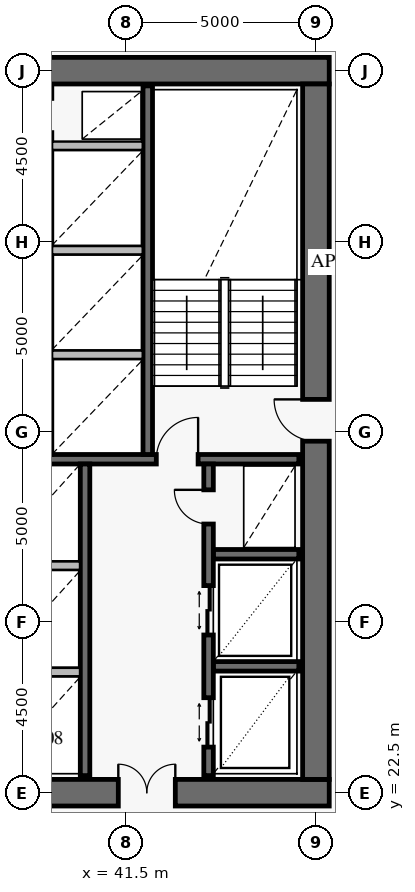
"""IFC4 building model, lengths in metres.
Left out: names, types, materials, properties, quantities, classifications, styles, units other than length and angle.
Written with IfcOpenShell. Run it as: python <this file> out.ifc"""

import sys

from ifc_helpers import new_model, si_unit, direction, frame, frame_2d, origin, place, context, subcontext, project, spatial, rectangle, extrude, element, fill, save


model = new_model("IFC4")
c1 = context("Model", 3, precision=1e-05, world=origin(), true_north=direction((0.0, 1.0)))
c2 = subcontext(c1, "Body", "Model", "MODEL_VIEW")
j1 = project(units=[si_unit("LENGTHUNIT", "METRE"), si_unit("PLANEANGLEUNIT", "RADIAN")], contexts=[c1])
p1 = place(None, origin())
s1 = spatial("IfcSite", under=j1, at=p1, CompositionType="ELEMENT")
p2 = place(p1, origin())
s2 = spatial("IfcBuilding", under=s1, at=p2, CompositionType="ELEMENT")
p3 = place(p2, frame((0.0, 0.0, 126.6)))
s3 = spatial("IfcBuildingStorey", under=s2, at=p3, CompositionType="ELEMENT", Elevation=126.6)
p4 = place(p3, frame((37.35, 22.5, 0.0), z_axis=(0.0, 0.0, 1.0), x_axis=(1.0, 0.0, 0.0)))
e1 = element("IfcWall", 1, at=p4, inside=s3, PredefinedType="SHEAR", context=c2, shape_type="SweptSolid", body=[
    extrude(rectangle(XDim=9.5, YDim=0.7, at=frame_2d((4.75, 0.0))), origin(), (0.0, 0.0, 1.0), 3.8),
])
p5 = place(p4, frame((3.95, 0.0, 0.0)))
e2 = element("IfcOpeningElement", 2, at=p5, cuts=e1, PredefinedType="OPENING", context=c2, shape_type="SweptSolid", body=[
    extrude(rectangle(XDim=1.5, YDim=2.15, at=frame_2d((0.75, 1.075))), frame((0.0, 0.362, 0.0), z_axis=(0.0, -1.0, 0.0), x_axis=(1.0, 0.0, 0.0)), (0.0, 0.0, 1.0), 0.724),
])
p6 = place(p3, frame((46.85, 41.5, 0.0), z_axis=(0.0, 0.0, 1.0), x_axis=(-1.0, 0.0, 0.0)))
e3 = element("IfcWall", 3, at=p6, inside=s3, PredefinedType="SHEAR", context=c2, shape_type="SweptSolid", body=[
    extrude(rectangle(XDim=7.9, YDim=0.7, at=frame_2d((3.95, 0.0))), origin(), (0.0, 0.0, 1.0), 3.8),
])
p7 = place(p3, frame((46.5, 22.85, 0.0), z_axis=(0.0, 0.0, 1.0), x_axis=(0.0, 1.0, 0.0)))
e4 = element("IfcWall", 4, at=p7, inside=s3, PredefinedType="SHEAR", context=c2, shape_type="SweptSolid", body=[
    extrude(rectangle(XDim=18.3, YDim=0.7, at=frame_2d((9.15, 0.0))), origin(), (0.0, 0.0, 1.0), 3.8),
])
p8 = place(p7, frame((8.9, 0.0, 0.0)))
e5 = element("IfcOpeningElement", 5, at=p8, cuts=e4, PredefinedType="OPENING", context=c2, shape_type="SweptSolid", body=[
    extrude(rectangle(XDim=1.1, YDim=2.15, at=frame_2d((0.55, 1.075))), frame((0.0, 0.362, 0.0), z_axis=(0.0, -1.0, 0.0), x_axis=(1.0, 0.0, 0.0)), (0.0, 0.0, 1.0), 0.724),
])
p9 = place(p3, frame((25.95, 31.275, 0.0), z_axis=(0.0, 0.0, 1.0), x_axis=(1.0, 0.0, 0.0)))
e6 = element("IfcWall", 6, at=p9, inside=s3, PredefinedType="SOLIDWALL", context=c2, shape_type="SweptSolid", body=[
    extrude(rectangle(XDim=20.1, YDim=0.25, at=frame_2d((10.05, 0.0))), origin(), (0.0, 0.0, 1.0), 3.8),
])
p10 = place(p9, frame((2.6, 0.0, 0.0)))
e7 = element("IfcOpeningElement", 7, at=p10, cuts=e6, PredefinedType="OPENING", context=c2, shape_type="SweptSolid", body=[
    extrude(rectangle(XDim=1.1, YDim=2.15, at=frame_2d((0.55, 1.075))), frame((0.0, 0.137, 0.0), z_axis=(0.0, -1.0, 0.0), x_axis=(1.0, 0.0, 0.0)), (0.0, 0.0, 1.0), 0.274),
])
p11 = place(p9, frame((10.6, 0.0, 0.0)))
e8 = element("IfcOpeningElement", 8, at=p11, cuts=e6, PredefinedType="OPENING", context=c2, shape_type="SweptSolid", body=[
    extrude(rectangle(XDim=1.1, YDim=2.15, at=frame_2d((0.55, 1.075))), frame((0.0, 0.137, 0.0), z_axis=(0.0, -1.0, 0.0), x_axis=(1.0, 0.0, 0.0)), (0.0, 0.0, 1.0), 0.274),
])
p12 = place(p9, frame((16.35, 0.0, 0.0)))
e9 = element("IfcOpeningElement", 9, at=p12, cuts=e6, PredefinedType="OPENING", context=c2, shape_type="SweptSolid", body=[
    extrude(rectangle(XDim=1.1, YDim=2.15, at=frame_2d((0.55, 1.075))), frame((0.0, 0.137, 0.0), z_axis=(0.0, -1.0, 0.0), x_axis=(1.0, 0.0, 0.0)), (0.0, 0.0, 1.0), 0.274),
])
p13 = place(p3, frame((42.075, 31.4, 0.0), z_axis=(0.0, 0.0, 1.0), x_axis=(0.0, 1.0, 0.0)))
e10 = element("IfcWall", 10, at=p13, inside=s3, PredefinedType="SOLIDWALL", context=c2, shape_type="SweptSolid", body=[
    extrude(rectangle(XDim=9.7, YDim=0.25, at=frame_2d((4.85, 0.0))), origin(), (0.0, 0.0, 1.0), 3.8),
])
p14 = place(p3, frame((40.425, 22.95, 0.0), z_axis=(0.0, 0.0, 1.0), x_axis=(0.0, 1.0, 0.0)))
e11 = element("IfcWall", 11, at=p14, inside=s3, PredefinedType="SOLIDWALL", context=c2, shape_type="SweptSolid", body=[
    extrude(rectangle(XDim=8.2, YDim=0.25, at=frame_2d((4.1, 0.0))), origin(), (0.0, 0.0, 1.0), 3.8),
])
for number, where, z_axis, x_axis in (
    (12, (43.8, 25.825, 0.0), (0.0, 0.0, 1.0), (1.0, 0.0, 0.0)),
    (13, (43.8, 28.775, 0.0), (0.0, 0.0, 1.0), (1.0, 0.0, 0.0)),
):
    element("IfcWall", number, at=place(p3, frame(where, z_axis=z_axis, x_axis=x_axis)), inside=s3, PredefinedType="SOLIDWALL", context=c2, shape_type="SweptSolid", body=[
        extrude(rectangle(XDim=2.25, YDim=0.25, at=frame_2d((1.125, 0.0))), origin(), (0.0, 0.0, 1.0), 3.8),
    ])
p15 = place(p3, frame((43.675, 22.95, 0.0), z_axis=(0.0, 0.0, 1.0), x_axis=(0.0, 1.0, 0.0)))
e14 = element("IfcWall", 14, at=p15, inside=s3, PredefinedType="SOLIDWALL", context=c2, shape_type="SweptSolid", body=[
    extrude(rectangle(XDim=8.2, YDim=0.25, at=frame_2d((4.1, 0.0))), origin(), (0.0, 0.0, 1.0), 3.8),
])
p16 = place(p15, frame((0.75, 0.0, 0.0)))
e15 = element("IfcOpeningElement", 15, at=p16, cuts=e14, PredefinedType="OPENING", context=c2, shape_type="SweptSolid", body=[
    extrude(rectangle(XDim=1.3, YDim=2.3, at=frame_2d((0.65, 1.15))), frame((0.0, 0.137, 0.0), z_axis=(0.0, -1.0, 0.0), x_axis=(1.0, 0.0, 0.0)), (0.0, 0.0, 1.0), 0.274),
])
p17 = place(p15, frame((3.7, 0.0, 0.0)))
e16 = element("IfcOpeningElement", 16, at=p17, cuts=e14, PredefinedType="OPENING", context=c2, shape_type="SweptSolid", body=[
    extrude(rectangle(XDim=1.3, YDim=2.3, at=frame_2d((0.65, 1.15))), frame((0.0, 0.137, 0.0), z_axis=(0.0, -1.0, 0.0), x_axis=(1.0, 0.0, 0.0)), (0.0, 0.0, 1.0), 0.274),
])
p18 = place(p15, frame((6.62, 0.0, 0.0)))
e17 = element("IfcOpeningElement", 17, at=p18, cuts=e14, PredefinedType="OPENING", context=c2, shape_type="SweptSolid", body=[
    extrude(rectangle(XDim=0.9, YDim=2.1, at=frame_2d((0.45, 1.05))), frame((0.0, 0.137, 0.0), z_axis=(0.0, -1.0, 0.0), x_axis=(1.0, 0.0, 0.0)), (0.0, 0.0, 1.0), 0.274),
])
for number, where, z_axis, x_axis in (
    (18, (39.558, 34.025, 0.0), (0.0, 0.0, 1.0), (1.0, 0.0, 0.0)),
    (19, (39.558, 36.775, 0.0), (0.0, 0.0, 1.0), (1.0, 0.0, 0.0)),
    (20, (39.558, 39.525, 0.0), (0.0, 0.0, 1.0), (1.0, 0.0, 0.0)),
):
    element("IfcWall", number, at=place(p3, frame(where, z_axis=z_axis, x_axis=x_axis)), inside=s3, PredefinedType="PARTITIONING", context=c2, shape_type="SweptSolid", body=[
        extrude(rectangle(XDim=2.384, YDim=0.22, at=frame_2d((1.192, 0.0))), origin(), (0.0, 0.0, 1.0), 3.55),
    ])
for number, where, z_axis, x_axis in (
    (21, (38.008, 25.675, 0.0), (0.0, 0.0, 1.0), (1.0, 0.0, 0.0)),
    (22, (38.008, 28.475, 0.0), (0.0, 0.0, 1.0), (1.0, 0.0, 0.0)),
):
    element("IfcWall", number, at=place(p3, frame(where, z_axis=z_axis, x_axis=x_axis)), inside=s3, PredefinedType="PARTITIONING", context=c2, shape_type="SweptSolid", body=[
        extrude(rectangle(XDim=2.284, YDim=0.22, at=frame_2d((1.142, 0.0))), origin(), (0.0, 0.0, 1.0), 3.55),
    ])
p19 = place(p8, origin())
e23 = element("IfcDoor", 23, at=p19, inside=s3, OperationType="SINGLE_SWING_RIGHT", PredefinedType="USERDEFINED", context=c2, shape_type="SweptSolid", body=[
    extrude(rectangle(XDim=1.1, YDim=2.15, at=frame_2d((0.55, 1.075))), frame((0.0, 0.025, 0.0), z_axis=(0.0, -1.0, 0.0), x_axis=(1.0, 0.0, 0.0)), (0.0, 0.0, 1.0), 0.05),
])
fill(e5, e23)
p20 = place(p5, origin())
e24 = element("IfcDoor", 24, at=p20, inside=s3, OperationType="DOUBLE_DOOR_SINGLE_SWING", PredefinedType="DOOR", context=c2, shape_type="SweptSolid", body=[
    extrude(rectangle(XDim=1.5, YDim=2.15, at=frame_2d((0.75, 1.075))), frame((0.0, 0.025, 0.0), z_axis=(0.0, -1.0, 0.0), x_axis=(1.0, 0.0, 0.0)), (0.0, 0.0, 1.0), 0.05),
])
fill(e2, e24)
p21 = place(p12, origin())
e25 = element("IfcDoor", 25, at=p21, inside=s3, OperationType="SINGLE_SWING_RIGHT", PredefinedType="USERDEFINED", context=c2, shape_type="SweptSolid", body=[
    extrude(rectangle(XDim=1.1, YDim=2.15, at=frame_2d((0.55, 1.075))), frame((0.0, 0.025, 0.0), z_axis=(0.0, -1.0, 0.0), x_axis=(1.0, 0.0, 0.0)), (0.0, 0.0, 1.0), 0.05),
])
fill(e9, e25)
p22 = place(p16, origin())
e26 = element("IfcDoor", 26, at=p22, inside=s3, OperationType="DOUBLE_DOOR_SLIDING", PredefinedType="DOOR", context=c2, shape_type="SweptSolid", body=[
    extrude(rectangle(XDim=1.3, YDim=2.3, at=frame_2d((0.65, 1.15))), frame((0.0, 0.025, 0.0), z_axis=(0.0, -1.0, 0.0), x_axis=(1.0, 0.0, 0.0)), (0.0, 0.0, 1.0), 0.05),
])
fill(e15, e26)
p23 = place(p17, origin())
e27 = element("IfcDoor", 27, at=p23, inside=s3, OperationType="DOUBLE_DOOR_SLIDING", PredefinedType="DOOR", context=c2, shape_type="SweptSolid", body=[
    extrude(rectangle(XDim=1.3, YDim=2.3, at=frame_2d((0.65, 1.15))), frame((0.0, 0.025, 0.0), z_axis=(0.0, -1.0, 0.0), x_axis=(1.0, 0.0, 0.0)), (0.0, 0.0, 1.0), 0.05),
])
fill(e16, e27)
p24 = place(p18, origin())
e28 = element("IfcDoor", 28, at=p24, inside=s3, OperationType="SINGLE_SWING_RIGHT", PredefinedType="DOOR", context=c2, shape_type="SweptSolid", body=[
    extrude(rectangle(XDim=0.9, YDim=2.1, at=frame_2d((0.45, 1.05))), frame((0.0, 0.025, 0.0), z_axis=(0.0, -1.0, 0.0), x_axis=(1.0, 0.0, 0.0)), (0.0, 0.0, 1.0), 0.05),
])
fill(e17, e28)
save(model, sys.argv[1])
